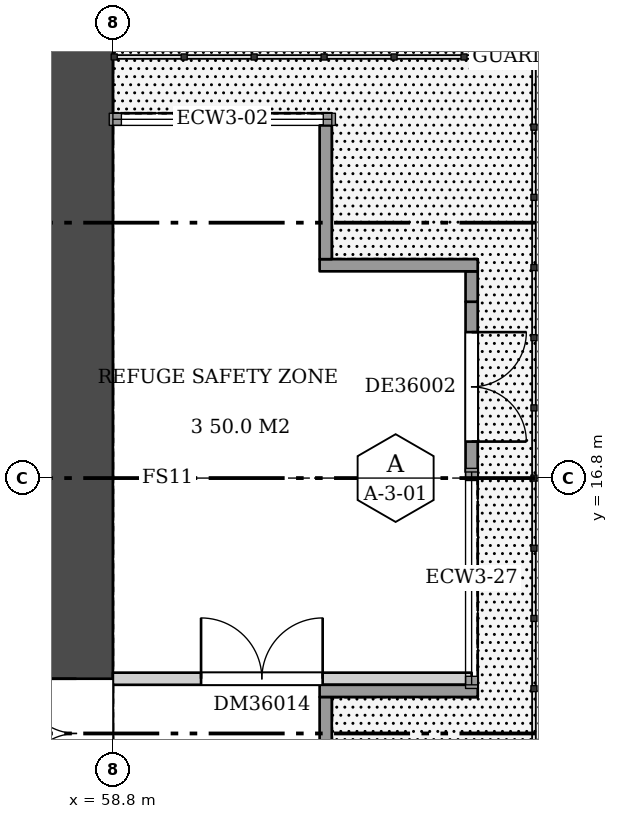
"""IFC4 building model, lengths in metres.
Left out: names, types, materials, properties, quantities, classifications, styles, units other than length and angle.
Written with IfcOpenShell. Run it as: python <this file> out.ifc"""

import sys

from ifc_helpers import new_model, si_unit, direction, frame, frame_2d, origin, place, context, subcontext, project, spatial, rectangle, extrude, element, fill, save


model = new_model("IFC4")
c1 = context("Model", 3, precision=1e-05, world=origin(), true_north=direction((0.0, 1.0)))
c2 = subcontext(c1, "Body", "Model", "MODEL_VIEW")
j1 = project(units=[si_unit("LENGTHUNIT", "METRE"), si_unit("PLANEANGLEUNIT", "RADIAN")], contexts=[c1])
p1 = place(None, origin())
s1 = spatial("IfcSite", under=j1, at=p1, CompositionType="ELEMENT")
p2 = place(p1, origin())
s2 = spatial("IfcBuilding", under=s1, at=p2, CompositionType="ELEMENT")
p3 = place(p2, frame((0.0, 0.0, 140.7)))
s3 = spatial("IfcBuildingStorey", under=s2, at=p3, CompositionType="ELEMENT", Elevation=140.7)
p4 = place(p3, frame((58.2, 9.6, 0.0), z_axis=(0.0, 0.0, 1.0), x_axis=(0.0, 1.0, 0.0)))
e1 = element("IfcWall", 1, at=p4, inside=s3, PredefinedType="SHEAR", context=c2, shape_type="SweptSolid", body=[
    extrude(rectangle(XDim=14.4, YDim=1.2, at=frame_2d((7.2, 0.0))), origin(), (0.0, 0.0, 1.0), 6.72),
])
p5 = place(p4, frame((2.1, 0.0, 0.0)))
e2 = element("IfcOpeningElement", 2, at=p5, cuts=e1, PredefinedType="OPENING", context=c2, shape_type="SweptSolid", body=[
    extrude(rectangle(XDim=1.8, YDim=2.1, at=frame_2d((0.9, 1.05))), frame((0.0, 0.61, 0.0), z_axis=(0.0, -1.0, 0.0), x_axis=(1.0, 0.0, 0.0)), (0.0, 0.0, 1.0), 1.22),
])
p6 = place(p3, frame((58.8, 13.5, 0.0), z_axis=(0.0, 0.0, 1.0), x_axis=(1.0, 0.0, 0.0)))
e3 = element("IfcWall", 3, at=p6, inside=s3, PredefinedType="PARTITIONING", context=c2, shape_type="SweptSolid", body=[
    extrude(rectangle(XDim=5.9, YDim=0.2, at=frame_2d((2.95, 0.0))), origin(), (0.0, 0.0, 1.0), 6.72),
])
p7 = place(p6, frame((1.45, 0.0, 0.0)))
e4 = element("IfcOpeningElement", 4, at=p7, cuts=e3, PredefinedType="OPENING", context=c2, shape_type="SweptSolid", body=[
    extrude(rectangle(XDim=2.0, YDim=2.1, at=frame_2d((1.0, 1.05))), frame((0.0, 0.11, 0.0), z_axis=(0.0, -1.0, 0.0), x_axis=(1.0, 0.0, 0.0)), (0.0, 0.0, 1.0), 0.22),
])
p8 = place(p3, frame((62.3, 11.0, 0.0), z_axis=(0.0, 0.0, 1.0), x_axis=(0.0, 1.0, 0.0)))
e5 = element("IfcWall", 5, at=p8, inside=s3, PredefinedType="SOLIDWALL", context=c2, shape_type="SweptSolid", body=[
    extrude(rectangle(XDim=2.2, YDim=0.2, at=frame_2d((1.1, 0.0))), origin(), (0.0, 0.0, 1.0), 6.72),
])
p9 = place(p3, frame((62.2, 13.3, 0.0), z_axis=(0.0, 0.0, 1.0), x_axis=(1.0, 0.0, 0.0)))
e6 = element("IfcWall", 6, at=p9, inside=s3, PredefinedType="SOLIDWALL", context=c2, shape_type="SweptSolid", body=[
    extrude(rectangle(XDim=2.6, YDim=0.2, at=frame_2d((1.3, 0.0))), origin(), (0.0, 0.0, 1.0), 6.72),
])
p10 = place(p3, frame((64.7, 16.9, 0.0), z_axis=(0.0, 0.0, 1.0), x_axis=(0.0, 1.0, 0.0)))
e7 = element("IfcWall", 7, at=p10, inside=s3, PredefinedType="SOLIDWALL", context=c2, shape_type="SweptSolid", body=[
    extrude(rectangle(XDim=2.8, YDim=0.2, at=frame_2d((1.4, 0.0))), origin(), (0.0, 0.0, 1.0), 6.72),
])
p11 = place(p10, frame((0.5, 0.0, 0.0)))
e8 = element("IfcOpeningElement", 8, at=p11, cuts=e7, PredefinedType="OPENING", context=c2, shape_type="SweptSolid", body=[
    extrude(rectangle(XDim=1.8, YDim=2.4, at=frame_2d((0.9, 1.2))), frame((0.0, 0.11, 0.0), z_axis=(0.0, -1.0, 0.0), x_axis=(1.0, 0.0, 0.0)), (0.0, 0.0, 1.0), 0.22),
])
p12 = place(p3, frame((64.7, 19.7, 0.0), z_axis=(0.0, 0.0, 1.0), x_axis=(0.0, 1.0, 0.0)))
e9 = element("IfcWall", 9, at=p12, inside=s3, PredefinedType="SOLIDWALL", context=c2, shape_type="SweptSolid", body=[
    extrude(rectangle(XDim=0.5, YDim=0.2, at=frame_2d((0.25, 0.0))), origin(), (0.0, 0.0, 1.0), 6.72),
])
p13 = place(p3, frame((64.8, 20.3, 0.0), z_axis=(0.0, 0.0, 1.0), x_axis=(-1.0, 0.0, 0.0)))
e10 = element("IfcWall", 10, at=p13, inside=s3, PredefinedType="SOLIDWALL", context=c2, shape_type="SweptSolid", body=[
    extrude(rectangle(XDim=2.6, YDim=0.2, at=frame_2d((1.3, 0.0))), origin(), (0.0, 0.0, 1.0), 6.72),
])
p14 = place(p3, frame((62.3, 20.4, 0.0), z_axis=(0.0, 0.0, 1.0), x_axis=(0.0, 1.0, 0.0)))
e11 = element("IfcWall", 11, at=p14, inside=s3, PredefinedType="SOLIDWALL", context=c2, shape_type="SweptSolid", body=[
    extrude(rectangle(XDim=2.2, YDim=0.2, at=frame_2d((1.1, 0.0))), origin(), (0.0, 0.0, 1.0), 6.72),
])
p15 = place(p5, origin())
e12 = element("IfcDoor", 12, at=p15, inside=s3, OperationType="DOUBLE_DOOR_SINGLE_SWING", PredefinedType="DOOR", context=c2, shape_type="SweptSolid", body=[
    extrude(rectangle(XDim=1.8, YDim=2.1, at=frame_2d((0.9, 1.05))), frame((0.0, 0.025, 0.0), z_axis=(0.0, -1.0, 0.0), x_axis=(1.0, 0.0, 0.0)), (0.0, 0.0, 1.0), 0.05),
])
fill(e2, e12)
p16 = place(p7, origin())
e13 = element("IfcDoor", 13, at=p16, inside=s3, OperationType="DOUBLE_DOOR_SINGLE_SWING", PredefinedType="DOOR", context=c2, shape_type="SweptSolid", body=[
    extrude(rectangle(XDim=2.0, YDim=2.1, at=frame_2d((1.0, 1.05))), frame((0.0, 0.025, 0.0), z_axis=(0.0, -1.0, 0.0), x_axis=(1.0, 0.0, 0.0)), (0.0, 0.0, 1.0), 0.05),
])
fill(e4, e13)
p17 = place(p11, frame((1.8, 0.0, 0.0), z_axis=(0.0, 0.0, 1.0), x_axis=(-1.0, 0.0, 0.0)))
e14 = element("IfcDoor", 14, at=p17, inside=s3, OperationType="DOUBLE_DOOR_SINGLE_SWING", PredefinedType="DOOR", context=c2, shape_type="SweptSolid", body=[
    extrude(rectangle(XDim=1.8, YDim=2.4, at=frame_2d((0.9, 1.2))), frame((0.0, 0.025, 0.0), z_axis=(0.0, -1.0, 0.0), x_axis=(1.0, 0.0, 0.0)), (0.0, 0.0, 1.0), 0.05),
])
fill(e8, e14)
save(model, sys.argv[1])
